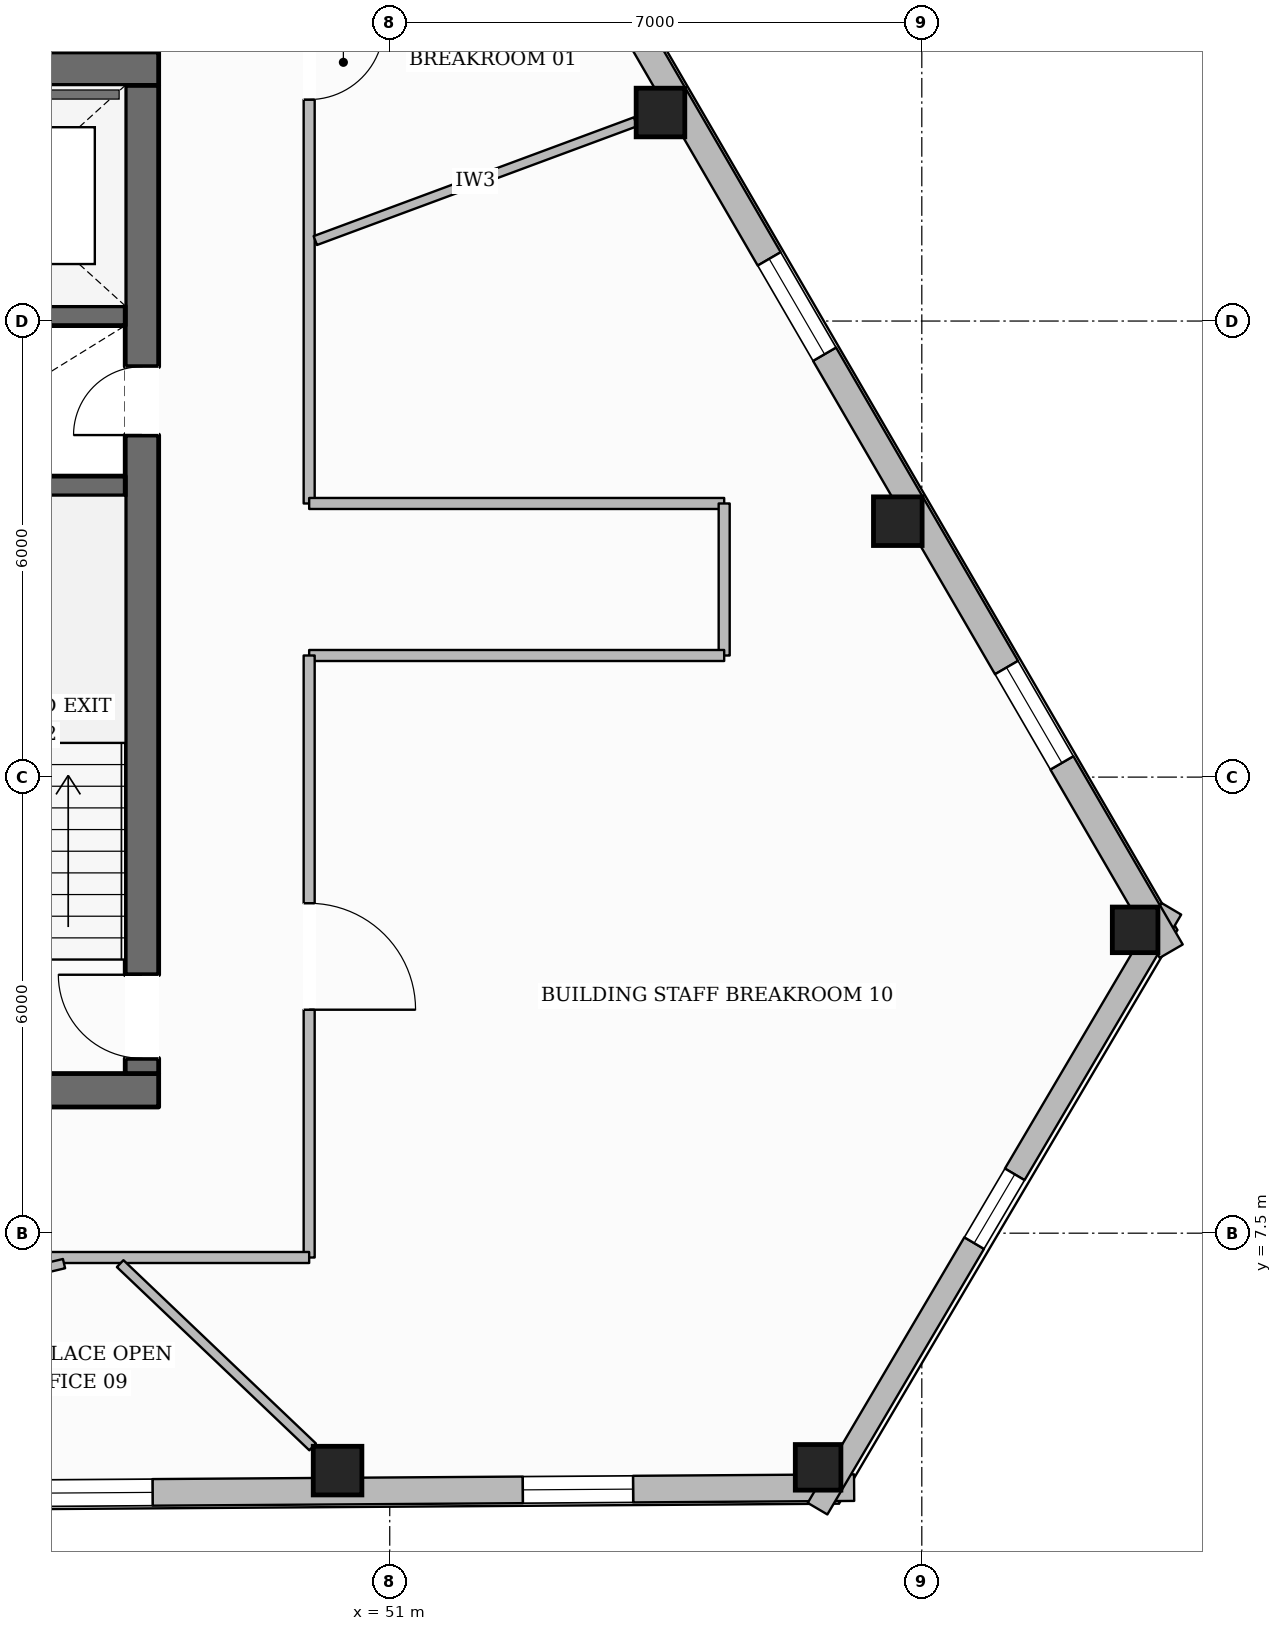
"""IFC4 building model, lengths in metres.
Left out: names, types, materials, properties, quantities, classifications, styles, units other than length and angle.
Written with IfcOpenShell. Run it as: python <this file> out.ifc"""

import sys

from ifc_helpers import new_model, si_unit, direction, frame, frame_2d, origin, origin_2d, place, context, subcontext, project, spatial, rectangle, hollow_rectangle, extrude, element, fill, save


model = new_model("IFC4")
c1 = context("Model", 3, precision=1e-05, world=origin(), true_north=direction((0.0, 1.0)))
c2 = subcontext(c1, "Body", "Model", "MODEL_VIEW")
j1 = project(units=[si_unit("LENGTHUNIT", "METRE"), si_unit("PLANEANGLEUNIT", "RADIAN")], contexts=[c1])
p1 = place(None, origin())
s1 = spatial("IfcSite", under=j1, at=p1, CompositionType="ELEMENT")
p2 = place(p1, origin())
s2 = spatial("IfcBuilding", under=s1, at=p2, CompositionType="ELEMENT")
p3 = place(p2, frame((0.0, 0.0, 211.2)))
s3 = spatial("IfcBuildingStorey", under=s2, at=p3, CompositionType="ELEMENT", Elevation=211.2)
p4 = place(p3, frame((28.04, 9.38, 0.0), z_axis=(0.0, 0.0, 1.0), x_axis=(1.0, 0.0, 0.0)))
e1 = element("IfcWall", 1, at=p4, inside=s3, PredefinedType="SOLIDWALL", context=c2, shape_type="SweptSolid", body=[
    extrude(rectangle(XDim=19.92, YDim=0.44, at=frame_2d((9.96, 0.0))), origin(), (0.0, 0.0, 1.0), 3.6),
])
p5 = place(p4, frame((10.46, 0.0, 0.0)))
e2 = element("IfcOpeningElement", 2, at=p5, cuts=e1, PredefinedType="OPENING", context=c2, shape_type="SweptSolid", body=[
    extrude(rectangle(XDim=1.4, YDim=2.2, at=frame_2d((0.7, 1.1))), frame((0.0, 0.23, 0.0), z_axis=(0.0, -1.0, 0.0), x_axis=(1.0, 0.0, 0.0)), (0.0, 0.0, 1.0), 0.46),
])
p6 = place(p3, frame((28.04, 22.82, 0.0), z_axis=(0.0, 0.0, 1.0), x_axis=(1.0, 0.0, 0.0)))
e3 = element("IfcWall", 3, at=p6, inside=s3, PredefinedType="SOLIDWALL", context=c2, shape_type="SweptSolid", body=[
    extrude(rectangle(XDim=19.92, YDim=0.44, at=frame_2d((9.96, 0.0))), origin(), (0.0, 0.0, 1.0), 3.6),
])
p7 = place(p6, frame((6.235, 0.0, 0.0)))
e4 = element("IfcOpeningElement", 4, at=p7, cuts=e3, PredefinedType="OPENING", context=c2, shape_type="SweptSolid", body=[
    extrude(rectangle(XDim=1.05, YDim=2.15, at=frame_2d((0.525, 1.075))), frame((0.0, 0.23, 0.0), z_axis=(0.0, -1.0, 0.0), x_axis=(1.0, 0.0, 0.0)), (0.0, 0.0, 1.0), 0.46),
])
p8 = place(p6, frame((12.635, 0.0, 0.0)))
e5 = element("IfcOpeningElement", 5, at=p8, cuts=e3, PredefinedType="OPENING", context=c2, shape_type="SweptSolid", body=[
    extrude(rectangle(XDim=1.05, YDim=2.15, at=frame_2d((0.525, 1.075))), frame((0.0, 0.23, 0.0), z_axis=(0.0, -1.0, 0.0), x_axis=(1.0, 0.0, 0.0)), (0.0, 0.0, 1.0), 0.46),
])
p9 = place(p3, frame((47.74, 9.6, 0.0), z_axis=(0.0, 0.0, 1.0), x_axis=(0.0, 1.0, 0.0)))
e6 = element("IfcWall", 6, at=p9, inside=s3, PredefinedType="SOLIDWALL", context=c2, shape_type="SweptSolid", body=[
    extrude(rectangle(XDim=13.0, YDim=0.44, at=frame_2d((6.5, 0.0))), origin(), (0.0, 0.0, 1.0), 3.6),
])
p10 = place(p9, frame((0.2, 0.0, 0.0)))
e7 = element("IfcOpeningElement", 7, at=p10, cuts=e6, PredefinedType="OPENING", context=c2, shape_type="SweptSolid", body=[
    extrude(rectangle(XDim=1.1, YDim=2.15, at=frame_2d((0.55, 1.075))), frame((0.0, 0.23, 0.0), z_axis=(0.0, -1.0, 0.0), x_axis=(1.0, 0.0, 0.0)), (0.0, 0.0, 1.0), 0.46),
])
p11 = place(p9, frame((8.4, 0.0, 0.0)))
e8 = element("IfcOpeningElement", 8, at=p11, cuts=e6, PredefinedType="OPENING", context=c2, shape_type="SweptSolid", body=[
    extrude(rectangle(XDim=0.9, YDim=2.1, at=frame_2d((0.45, 1.05))), frame((0.0, 0.23, 0.0), z_axis=(0.0, -1.0, 0.0), x_axis=(1.0, 0.0, 0.0)), (0.0, 0.0, 1.0), 0.46),
])
for number, where, z_axis, x_axis in (
    (9, (44.32, 17.33, 0.0), (0.0, 0.0, 1.0), (1.0, 0.0, 0.0)),
    (10, (44.32, 19.57, 0.0), (0.0, 0.0, 1.0), (1.0, 0.0, 0.0)),
):
    element("IfcWall", number, at=place(p3, frame(where, z_axis=z_axis, x_axis=x_axis)), inside=s3, PredefinedType="SHEAR", context=c2, shape_type="SweptSolid", body=[
        extrude(rectangle(XDim=3.2, YDim=0.26, at=frame_2d((1.6, 0.0))), origin(), (0.0, 0.0, 1.0), 3.6),
    ])
p12 = place(p3, frame((50.314, 4.376, 0.0), z_axis=(0.0, 0.0, 1.0), x_axis=(1.0, 0.0, 0.0)))
e11 = element("IfcColumn", 11, at=p12, inside=s3, PredefinedType="COLUMN", context=c2, shape_type="SweptSolid", body=[
    extrude(hollow_rectangle(XDim=0.64, YDim=0.64, WallThickness=0.028, at=origin_2d()), origin(), (0.0, 0.0, 1.0), 3.6),
])
for number, where, z_axis, x_axis in (
    (12, (56.635, 4.419, 0.0), (0.0, 0.0, 1.0), (1.0, 0.0, 0.0)),
    (13, (60.806, 11.49, 0.0), (0.0, 0.0, 1.0), (1.0, 0.0, 0.0)),
):
    element("IfcColumn", number, at=place(p3, frame(where, z_axis=z_axis, x_axis=x_axis)), inside=s3, PredefinedType="COLUMN", context=c2, shape_type="SweptSolid", body=[
        extrude(hollow_rectangle(XDim=0.6, YDim=0.6, WallThickness=0.028, at=origin_2d()), origin(), (0.0, 0.0, 1.0), 3.6),
    ])
for number, where, z_axis, x_axis in (
    (14, (57.684, 16.867, 0.0), (0.0, 0.0, 1.0), (1.0, 0.0, 0.0)),
    (15, (54.562, 22.243, 0.0), (0.0, 0.0, 1.0), (1.0, 0.0, 0.0)),
):
    element("IfcColumn", number, at=place(p3, frame(where, z_axis=z_axis, x_axis=x_axis)), inside=s3, PredefinedType="COLUMN", context=c2, shape_type="SweptSolid", body=[
        extrude(hollow_rectangle(XDim=0.64, YDim=0.64, WallThickness=0.028, at=origin_2d()), origin(), (0.0, 0.0, 1.0), 3.6),
    ])
p13 = place(p3, frame((57.109, 4.153, 0.0), z_axis=(0.0, 0.0, 1.0), x_axis=(-0.999976880016, -0.006799958314, 0.0)))
e16 = element("IfcWall", 16, at=p13, inside=s3, PredefinedType="STANDARD", context=c2, shape_type="SweptSolid", body=[
    extrude(rectangle(XDim=38.883, YDim=0.35, at=frame_2d((19.442, 0.0))), origin(), (0.0, 0.0, 1.0), 3.132),
])
p14 = place(p13, frame((34.519, 0.0, 0.65)))
e17 = element("IfcOpeningElement", 17, at=p14, cuts=e16, PredefinedType="OPENING", context=c2, shape_type="SweptSolid", body=[
    extrude(rectangle(XDim=1.45, YDim=1.75, at=frame_2d((0.725, 0.875))), frame((0.0, 0.185, 0.0), z_axis=(0.0, -1.0, 0.0), x_axis=(1.0, 0.0, 0.0)), (0.0, 0.0, 1.0), 0.37),
])
p15 = place(p13, frame((28.197, 0.0, 0.65)))
e18 = element("IfcOpeningElement", 18, at=p15, cuts=e16, PredefinedType="OPENING", context=c2, shape_type="SweptSolid", body=[
    extrude(rectangle(XDim=1.45, YDim=1.75, at=frame_2d((0.725, 0.875))), frame((0.0, 0.185, 0.0), z_axis=(0.0, -1.0, 0.0), x_axis=(1.0, 0.0, 0.0)), (0.0, 0.0, 1.0), 0.37),
])
p16 = place(p13, frame((15.552, 0.0, 0.65)))
e19 = element("IfcOpeningElement", 19, at=p16, cuts=e16, PredefinedType="OPENING", context=c2, shape_type="SweptSolid", body=[
    extrude(rectangle(XDim=1.45, YDim=1.75, at=frame_2d((0.725, 0.875))), frame((0.0, 0.185, 0.0), z_axis=(0.0, -1.0, 0.0), x_axis=(1.0, 0.0, 0.0)), (0.0, 0.0, 1.0), 0.37),
])
p17 = place(p13, frame((9.23, 0.0, 0.65)))
e20 = element("IfcOpeningElement", 20, at=p17, cuts=e16, PredefinedType="OPENING", context=c2, shape_type="SweptSolid", body=[
    extrude(rectangle(XDim=1.45, YDim=1.75, at=frame_2d((0.725, 0.875))), frame((0.0, 0.185, 0.0), z_axis=(0.0, -1.0, 0.0), x_axis=(1.0, 0.0, 0.0)), (0.0, 0.0, 1.0), 0.37),
])
p18 = place(p13, frame((2.908, 0.0, 0.65)))
e21 = element("IfcOpeningElement", 21, at=p18, cuts=e16, PredefinedType="OPENING", context=c2, shape_type="SweptSolid", body=[
    extrude(rectangle(XDim=1.45, YDim=1.75, at=frame_2d((0.725, 0.875))), frame((0.0, 0.185, 0.0), z_axis=(0.0, -1.0, 0.0), x_axis=(1.0, 0.0, 0.0)), (0.0, 0.0, 1.0), 0.37),
])
p19 = place(p3, frame((61.283, 11.768, 0.0), z_axis=(0.0, 0.0, 1.0), x_axis=(-0.508035204802, -0.861336305215, 0.0)))
e22 = element("IfcWall", 22, at=p19, inside=s3, PredefinedType="STANDARD", context=c2, shape_type="SweptSolid", body=[
    extrude(rectangle(XDim=9.162, YDim=0.3, at=frame_2d((4.581, 0.0))), origin(), (0.0, 0.0, 1.0), 3.132),
])
p20 = place(p19, frame((4.056, 0.0, 0.65)))
e23 = element("IfcOpeningElement", 23, at=p20, cuts=e22, PredefinedType="OPENING", context=c2, shape_type="SweptSolid", body=[
    extrude(rectangle(XDim=1.05, YDim=1.7, at=frame_2d((0.525, 0.85))), frame((0.0, 0.16, 0.0), z_axis=(0.0, -1.0, 0.0), x_axis=(1.0, 0.0, 0.0)), (0.0, 0.0, 1.0), 0.32),
])
p21 = place(p3, frame((42.066, 44.299, 0.0), z_axis=(0.0, 0.0, 1.0), x_axis=(0.502188775534, -0.864758020331, 0.0)))
e24 = element("IfcWall", 24, at=p21, inside=s3, PredefinedType="STANDARD", context=c2, shape_type="SweptSolid", body=[
    extrude(rectangle(XDim=38.263, YDim=0.35, at=frame_2d((19.132, 0.0))), origin(), (0.0, 0.0, 1.0), 3.132),
])
p22 = place(p21, frame((33.948, 0.0, 0.65)))
e25 = element("IfcOpeningElement", 25, at=p22, cuts=e24, PredefinedType="OPENING", context=c2, shape_type="SweptSolid", body=[
    extrude(rectangle(XDim=1.45, YDim=1.75, at=frame_2d((0.725, 0.875))), frame((0.0, 0.185, 0.0), z_axis=(0.0, -1.0, 0.0), x_axis=(1.0, 0.0, 0.0)), (0.0, 0.0, 1.0), 0.37),
])
p23 = place(p21, frame((27.731, 0.0, 0.65)))
e26 = element("IfcOpeningElement", 26, at=p23, cuts=e24, PredefinedType="OPENING", context=c2, shape_type="SweptSolid", body=[
    extrude(rectangle(XDim=1.45, YDim=1.75, at=frame_2d((0.725, 0.875))), frame((0.0, 0.185, 0.0), z_axis=(0.0, -1.0, 0.0), x_axis=(1.0, 0.0, 0.0)), (0.0, 0.0, 1.0), 0.37),
])
p24 = place(p21, frame((15.297, 0.0, 0.65)))
e27 = element("IfcOpeningElement", 27, at=p24, cuts=e24, PredefinedType="OPENING", context=c2, shape_type="SweptSolid", body=[
    extrude(rectangle(XDim=1.45, YDim=1.75, at=frame_2d((0.725, 0.875))), frame((0.0, 0.185, 0.0), z_axis=(0.0, -1.0, 0.0), x_axis=(1.0, 0.0, 0.0)), (0.0, 0.0, 1.0), 0.37),
])
p25 = place(p21, frame((9.079, 0.0, 0.65)))
e28 = element("IfcOpeningElement", 28, at=p25, cuts=e24, PredefinedType="OPENING", context=c2, shape_type="SweptSolid", body=[
    extrude(rectangle(XDim=1.45, YDim=1.75, at=frame_2d((0.725, 0.875))), frame((0.0, 0.185, 0.0), z_axis=(0.0, -1.0, 0.0), x_axis=(1.0, 0.0, 0.0)), (0.0, 0.0, 1.0), 0.37),
])
p26 = place(p21, frame((2.862, 0.0, 0.65)))
e29 = element("IfcOpeningElement", 29, at=p26, cuts=e24, PredefinedType="OPENING", context=c2, shape_type="SweptSolid", body=[
    extrude(rectangle(XDim=1.45, YDim=1.75, at=frame_2d((0.725, 0.875))), frame((0.0, 0.185, 0.0), z_axis=(0.0, -1.0, 0.0), x_axis=(1.0, 0.0, 0.0)), (0.0, 0.0, 1.0), 0.37),
])
p27 = place(p3, frame((49.94, 25.02, 0.0), z_axis=(0.0, 0.0, 1.0), x_axis=(0.0, -1.0, 0.0)))
e30 = element("IfcWall", 30, at=p27, inside=s3, PredefinedType="PARTITIONING", context=c2, shape_type="SweptSolid", body=[
    extrude(rectangle(XDim=7.92, YDim=0.145, at=frame_2d((3.96, 0.0))), origin(), (0.0, 0.0, 1.0), 3.339),
])
p28 = place(p27, frame((1.626, 0.0, 0.0)))
e31 = element("IfcOpeningElement", 31, at=p28, cuts=e30, PredefinedType="OPENING", context=c2, shape_type="SweptSolid", body=[
    extrude(rectangle(XDim=0.98, YDim=2.15, at=frame_2d((0.49, 1.075))), frame((0.0, 0.083, 0.0), z_axis=(0.0, -1.0, 0.0), x_axis=(1.0, 0.0, 0.0)), (0.0, 0.0, 1.0), 0.165),
])
p29 = place(p3, frame((49.94, 17.1, 0.0), z_axis=(0.0, 0.0, 1.0), x_axis=(1.0, 0.0, 0.0)))
e32 = element("IfcWall", 32, at=p29, inside=s3, PredefinedType="PARTITIONING", context=c2, shape_type="SweptSolid", body=[
    extrude(rectangle(XDim=5.46, YDim=0.145, at=frame_2d((2.73, 0.0))), origin(), (0.0, 0.0, 1.0), 3.6),
])
p30 = place(p3, frame((55.4, 17.1, 0.0), z_axis=(0.0, 0.0, 1.0), x_axis=(0.0, -1.0, 0.0)))
e33 = element("IfcWall", 33, at=p30, inside=s3, PredefinedType="PARTITIONING", context=c2, shape_type="SweptSolid", body=[
    extrude(rectangle(XDim=2.0, YDim=0.145, at=frame_2d((1.0, 0.0))), origin(), (0.0, 0.0, 1.0), 3.339),
])
p31 = place(p3, frame((55.4, 15.1, 0.0), z_axis=(0.0, 0.0, 1.0), x_axis=(-1.0, 0.0, 0.0)))
e34 = element("IfcWall", 34, at=p31, inside=s3, PredefinedType="PARTITIONING", context=c2, shape_type="SweptSolid", body=[
    extrude(rectangle(XDim=5.46, YDim=0.145, at=frame_2d((2.73, 0.0))), origin(), (0.0, 0.0, 1.0), 3.6),
])
p32 = place(p3, frame((49.94, 15.1, 0.0), z_axis=(0.0, 0.0, 1.0), x_axis=(0.0, -1.0, 0.0)))
e35 = element("IfcWall", 35, at=p32, inside=s3, PredefinedType="PARTITIONING", context=c2, shape_type="SweptSolid", body=[
    extrude(rectangle(XDim=7.92, YDim=0.145, at=frame_2d((3.96, 0.0))), origin(), (0.0, 0.0, 1.0), 3.6),
])
p33 = place(p32, frame((3.26, 0.0, 0.0)))
e36 = element("IfcOpeningElement", 36, at=p33, cuts=e35, PredefinedType="OPENING", context=c2, shape_type="SweptSolid", body=[
    extrude(rectangle(XDim=1.4, YDim=2.2, at=frame_2d((0.7, 1.1))), frame((0.0, 0.083, 0.0), z_axis=(0.0, -1.0, 0.0), x_axis=(1.0, 0.0, 0.0)), (0.0, 0.0, 1.0), 0.165),
])
p34 = place(p3, frame((49.94, 7.18, 0.0), z_axis=(0.0, 0.0, 1.0), x_axis=(-1.0, 0.0, 0.0)))
e37 = element("IfcWall", 37, at=p34, inside=s3, PredefinedType="PARTITIONING", context=c2, shape_type="SweptSolid", body=[
    extrude(rectangle(XDim=23.88, YDim=0.145, at=frame_2d((11.94, 0.0))), origin(), (0.0, 0.0, 1.0), 3.6),
])
p35 = place(p34, frame((20.062, 0.0, 0.0)))
e38 = element("IfcOpeningElement", 38, at=p35, cuts=e37, PredefinedType="OPENING", context=c2, shape_type="SweptSolid", body=[
    extrude(rectangle(XDim=0.98, YDim=2.15, at=frame_2d((0.49, 1.075))), frame((0.0, 0.083, 0.0), z_axis=(0.0, -1.0, 0.0), x_axis=(1.0, 0.0, 0.0)), (0.0, 0.0, 1.0), 0.165),
])
p36 = place(p34, frame((10.027, 0.0, 0.0)))
e39 = element("IfcOpeningElement", 39, at=p36, cuts=e37, PredefinedType="OPENING", context=c2, shape_type="SweptSolid", body=[
    extrude(rectangle(XDim=1.02, YDim=2.15, at=frame_2d((0.51, 1.075))), frame((0.0, 0.083, 0.0), z_axis=(0.0, -1.0, 0.0), x_axis=(1.0, 0.0, 0.0)), (0.0, 0.0, 1.0), 0.165),
])
p37 = place(p3, frame((50.021, 20.559, 0.0), z_axis=(0.0, 0.0, 1.0), x_axis=(0.937586789971, 0.347751364156, 0.0)))
e40 = element("IfcWall", 40, at=p37, inside=s3, PredefinedType="PARTITIONING", context=c2, shape_type="SweptSolid", body=[
    extrude(rectangle(XDim=4.494, YDim=0.125, at=frame_2d((2.247, 0.0))), origin(), (0.0, 0.0, 1.0), 3.6),
])
p38 = place(p3, frame((47.453, 7.1, 0.0), z_axis=(0.0, 0.0, 1.0), x_axis=(0.724245859296, -0.68954182998, 0.0)))
e41 = element("IfcWall", 41, at=p38, inside=s3, PredefinedType="PARTITIONING", context=c2, shape_type="SweptSolid", body=[
    extrude(rectangle(XDim=3.496, YDim=0.125, at=frame_2d((1.748, 0.0))), origin(), (0.0, 0.0, 1.0), 3.6),
])
p39 = place(p3, frame((34.213, 4.147, 0.0), z_axis=(0.0, 0.0, 1.0), x_axis=(0.973225904265, 0.229850689075, 0.0)))
e42 = element("IfcWall", 42, at=p39, inside=s3, PredefinedType="PARTITIONING", context=c2, shape_type="SweptSolid", body=[
    extrude(rectangle(XDim=12.846, YDim=0.125, at=frame_2d((6.423, 0.0))), origin(), (0.0, 0.0, 1.0), 3.135),
])
p40 = place(p39, frame((5.984, 0.0, 0.0)))
e43 = element("IfcOpeningElement", 43, at=p40, cuts=e42, PredefinedType="OPENING", context=c2, shape_type="SweptSolid", body=[
    extrude(rectangle(XDim=0.98, YDim=2.15, at=frame_2d((0.49, 1.075))), frame((0.0, 0.073, 0.0), z_axis=(0.0, -1.0, 0.0), x_axis=(1.0, 0.0, 0.0)), (0.0, 0.0, 1.0), 0.145),
])
p41 = place(p17, origin())
e44 = element("IfcWindow", 44, at=p41, inside=s3, PartitioningType="SINGLE_PANEL", PredefinedType="WINDOW", context=c2, shape_type="SweptSolid", body=[
    extrude(rectangle(XDim=1.45, YDim=1.75, at=frame_2d((0.725, 0.875))), frame((0.0, 0.03, 0.0), z_axis=(0.0, -1.0, 0.0), x_axis=(1.0, 0.0, 0.0)), (0.0, 0.0, 1.0), 0.06),
])
fill(e20, e44)
p42 = place(p18, origin())
e45 = element("IfcWindow", 45, at=p42, inside=s3, PartitioningType="SINGLE_PANEL", PredefinedType="WINDOW", context=c2, shape_type="SweptSolid", body=[
    extrude(rectangle(XDim=1.45, YDim=1.75, at=frame_2d((0.725, 0.875))), frame((0.0, 0.03, 0.0), z_axis=(0.0, -1.0, 0.0), x_axis=(1.0, 0.0, 0.0)), (0.0, 0.0, 1.0), 0.06),
])
fill(e21, e45)
p43 = place(p22, origin())
e46 = element("IfcWindow", 46, at=p43, inside=s3, PartitioningType="SINGLE_PANEL", PredefinedType="WINDOW", context=c2, shape_type="SweptSolid", body=[
    extrude(rectangle(XDim=1.45, YDim=1.75, at=frame_2d((0.725, 0.875))), frame((0.0, 0.03, 0.0), z_axis=(0.0, -1.0, 0.0), x_axis=(1.0, 0.0, 0.0)), (0.0, 0.0, 1.0), 0.06),
])
fill(e25, e46)
p44 = place(p23, origin())
e47 = element("IfcWindow", 47, at=p44, inside=s3, PartitioningType="SINGLE_PANEL", PredefinedType="WINDOW", context=c2, shape_type="SweptSolid", body=[
    extrude(rectangle(XDim=1.45, YDim=1.75, at=frame_2d((0.725, 0.875))), frame((0.0, 0.03, 0.0), z_axis=(0.0, -1.0, 0.0), x_axis=(1.0, 0.0, 0.0)), (0.0, 0.0, 1.0), 0.06),
])
fill(e26, e47)
p45 = place(p20, origin())
e48 = element("IfcWindow", 48, at=p45, inside=s3, PartitioningType="SINGLE_PANEL", PredefinedType="WINDOW", context=c2, shape_type="SweptSolid", body=[
    extrude(rectangle(XDim=1.05, YDim=1.7, at=frame_2d((0.525, 0.85))), frame((0.0, 0.03, 0.0), z_axis=(0.0, -1.0, 0.0), x_axis=(1.0, 0.0, 0.0)), (0.0, 0.0, 1.0), 0.06),
])
fill(e23, e48)
p46 = place(p10, origin())
e49 = element("IfcDoor", 49, at=p46, inside=s3, OperationType="SINGLE_SWING_RIGHT", PredefinedType="DOOR", context=c2, shape_type="SweptSolid", body=[
    extrude(rectangle(XDim=1.1, YDim=2.15, at=frame_2d((0.55, 1.075))), frame((0.0, 0.025, 0.0), z_axis=(0.0, -1.0, 0.0), x_axis=(1.0, 0.0, 0.0)), (0.0, 0.0, 1.0), 0.05),
])
fill(e7, e49)
p47 = place(p11, origin())
e50 = element("IfcDoor", 50, at=p47, inside=s3, OperationType="SINGLE_SWING_LEFT", PredefinedType="DOOR", context=c2, shape_type="SweptSolid", body=[
    extrude(rectangle(XDim=0.9, YDim=2.1, at=frame_2d((0.45, 1.05))), frame((0.0, 0.025, 0.0), z_axis=(0.0, -1.0, 0.0), x_axis=(1.0, 0.0, 0.0)), (0.0, 0.0, 1.0), 0.05),
])
fill(e8, e50)
p48 = place(p28, origin())
e51 = element("IfcDoor", 51, at=p48, inside=s3, OperationType="SINGLE_SWING_LEFT", PredefinedType="DOOR", context=c2, shape_type="SweptSolid", body=[
    extrude(rectangle(XDim=0.98, YDim=2.15, at=frame_2d((0.49, 1.075))), frame((0.0, 0.025, 0.0), z_axis=(0.0, -1.0, 0.0), x_axis=(1.0, 0.0, 0.0)), (0.0, 0.0, 1.0), 0.05),
])
fill(e31, e51)
p49 = place(p33, origin())
e52 = element("IfcDoor", 52, at=p49, inside=s3, OperationType="SINGLE_SWING_RIGHT", PredefinedType="DOOR", context=c2, shape_type="SweptSolid", body=[
    extrude(rectangle(XDim=1.4, YDim=2.2, at=frame_2d((0.7, 1.1))), frame((0.0, 0.025, 0.0), z_axis=(0.0, -1.0, 0.0), x_axis=(1.0, 0.0, 0.0)), (0.0, 0.0, 1.0), 0.05),
])
fill(e36, e52)
save(model, sys.argv[1])
